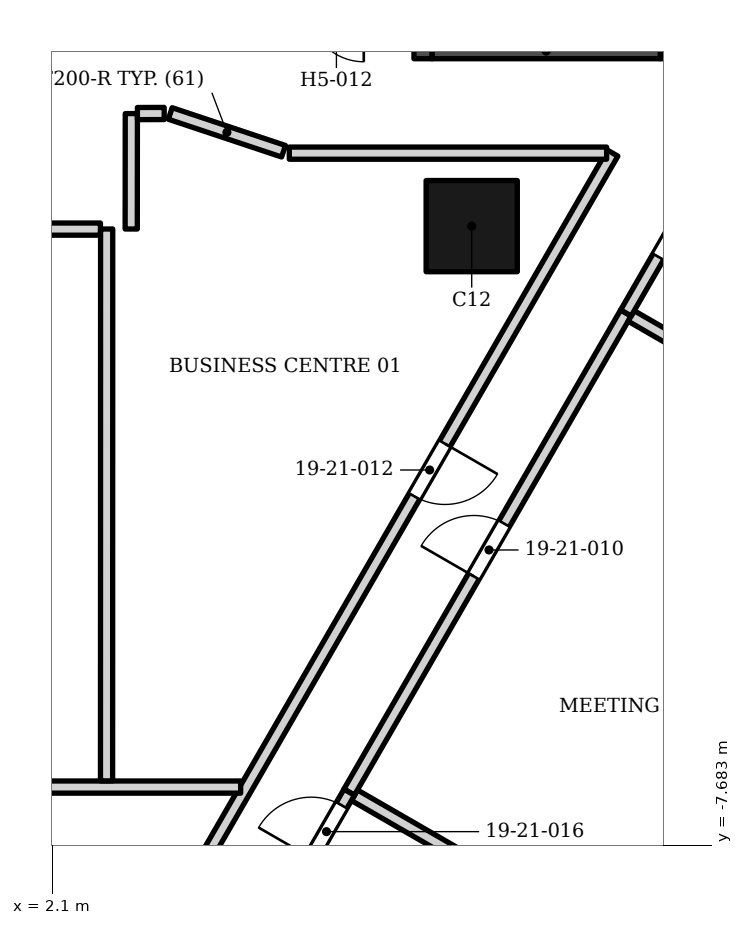
"""IFC4 building model, lengths in metres.
Left out: names, types, materials, properties, quantities, classifications, styles, units other than length and angle.
Written with IfcOpenShell. Run it as: python <this file> out.ifc"""

import sys

from ifc_helpers import new_model, si_unit, direction, frame, frame_2d, origin, origin_2d, place, context, subcontext, project, spatial, rectangle, extrude, element, fill, save


model = new_model("IFC4")
c1 = context("Model", 3, precision=1e-05, world=origin(), true_north=direction((0.0, 1.0)))
c2 = subcontext(c1, "Body", "Model", "MODEL_VIEW")
j1 = project(units=[si_unit("LENGTHUNIT", "METRE"), si_unit("PLANEANGLEUNIT", "RADIAN")], contexts=[c1])
p1 = place(None, origin())
s1 = spatial("IfcSite", under=j1, at=p1, CompositionType="ELEMENT")
p2 = place(p1, origin())
s2 = spatial("IfcBuilding", under=s1, at=p2, CompositionType="ELEMENT")
p3 = place(p2, frame((0.0, 0.0, 91.8)))
s3 = spatial("IfcBuildingStorey", under=s2, at=p3, CompositionType="ELEMENT", Elevation=91.8)
p4 = place(p3, frame((12.35, 5.253, 0.0), z_axis=(0.0, 0.0, 1.0), x_axis=(0.0, 1.0, 0.0)))
e1 = element("IfcWall", 1, at=p4, inside=s3, PredefinedType="SHEAR", context=c2, shape_type="SweptSolid", body=[
    extrude(rectangle(XDim=13.3, YDim=0.5, at=frame_2d((6.65, 0.0))), origin(), (0.0, 0.0, 1.0), 3.4),
])
p5 = place(p3, frame((8.2, 5.253, 0.0), z_axis=(0.0, 0.0, 1.0), x_axis=(0.0, 1.0, 0.0)))
e2 = element("IfcWall", 2, at=p5, inside=s3, PredefinedType="SHEAR", context=c2, shape_type="SweptSolid", body=[
    extrude(rectangle(XDim=13.3, YDim=0.3, at=frame_2d((6.65, 0.0))), origin(), (0.0, 0.0, 1.0), 3.4),
])
p6 = place(p5, frame((7.1, 0.0, 0.0)))
e3 = element("IfcOpeningElement", 3, at=p6, cuts=e2, PredefinedType="OPENING", context=c2, shape_type="SweptSolid", body=[
    extrude(rectangle(XDim=1.4, YDim=2.1, at=frame_2d((0.7, 1.05))), frame((0.0, 0.16, 0.0), z_axis=(0.0, -1.0, 0.0), x_axis=(1.0, 0.0, 0.0)), (0.0, 0.0, 1.0), 0.32),
])
p7 = place(p5, frame((5.05, 0.0, 0.0)))
e4 = element("IfcOpeningElement", 4, at=p7, cuts=e2, PredefinedType="OPENING", context=c2, shape_type="SweptSolid", body=[
    extrude(rectangle(XDim=1.4, YDim=2.1, at=frame_2d((0.7, 1.05))), frame((0.0, 0.16, 0.0), z_axis=(0.0, -1.0, 0.0), x_axis=(1.0, 0.0, 0.0)), (0.0, 0.0, 1.0), 0.32),
])
p8 = place(p3, frame((8.35, 5.378, 0.0), z_axis=(0.0, 0.0, 1.0), x_axis=(1.0, 0.0, 0.0)))
e5 = element("IfcWall", 5, at=p8, inside=s3, PredefinedType="SHEAR", context=c2, shape_type="SweptSolid", body=[
    extrude(rectangle(XDim=3.75, YDim=0.25, at=frame_2d((1.875, 0.0))), origin(), (0.0, 0.0, 1.0), 3.4),
])
p9 = place(p3, frame((9.0, 2.5, 0.0), z_axis=(0.0, 0.0, 1.0), x_axis=(1.0, 0.0, 0.0)))
e6 = element("IfcColumn", 6, at=p9, inside=s3, PredefinedType="COLUMN", context=c2, shape_type="SweptSolid", body=[
    extrude(rectangle(XDim=1.5, YDim=1.5, at=origin_2d()), origin(), (0.0, 0.0, 1.0), 3.4),
])
p10 = place(p3, frame((7.072, -6.86, 0.0), z_axis=(0.0, 0.0, 1.0), x_axis=(0.86615808173, -0.499770124611, 0.0)))
e7 = element("IfcWall", 7, at=p10, inside=s3, PredefinedType="PARTITIONING", context=c2, shape_type="SweptSolid", body=[
    extrude(rectangle(XDim=6.798, YDim=0.2, at=frame_2d((3.399, 0.0))), origin(), (0.0, 0.0, 1.0), 2.552),
])
p11 = place(p3, frame((3.379, -10.049, 0.0), z_axis=(0.0, 0.0, 1.0), x_axis=(0.50000242408, 0.866024004237, 0.0)))
e8 = element("IfcWall", 8, at=p11, inside=s3, PredefinedType="PARTITIONING", context=c2, shape_type="SweptSolid", body=[
    extrude(rectangle(XDim=15.877, YDim=0.2, at=frame_2d((7.938, 0.0))), origin(), (0.0, 0.0, 1.0), 2.384),
])
p12 = place(p11, frame((9.359, 0.0, 0.0)))
e9 = element("IfcOpeningElement", 9, at=p12, cuts=e8, PredefinedType="OPENING", context=c2, shape_type="SweptSolid", body=[
    extrude(rectangle(XDim=1.0, YDim=2.1, at=frame_2d((0.5, 1.05))), frame((0.0, 0.11, 0.0), z_axis=(0.0, -1.0, 0.0), x_axis=(1.0, 0.0, 0.0)), (0.0, 0.0, 1.0), 0.22),
])
p13 = place(p3, frame((6.985, -6.807, 0.0), z_axis=(0.0, 0.0, 1.0), x_axis=(0.500170742348, 0.865926803199, 0.0)))
e10 = element("IfcWall", 10, at=p13, inside=s3, PredefinedType="PARTITIONING", context=c2, shape_type="SweptSolid", body=[
    extrude(rectangle(XDim=9.098, YDim=0.2, at=frame_2d((4.549, 0.0))), origin(), (0.0, 0.0, 1.0), 2.552),
])
p14 = place(p13, frame((4.098, 0.0, 0.0)))
e11 = element("IfcOpeningElement", 11, at=p14, cuts=e10, PredefinedType="OPENING", context=c2, shape_type="SweptSolid", body=[
    extrude(rectangle(XDim=1.0, YDim=2.1, at=frame_2d((0.5, 1.05))), frame((0.0, 0.11, 0.0), z_axis=(0.0, -1.0, 0.0), x_axis=(1.0, 0.0, 0.0)), (0.0, 0.0, 1.0), 0.22),
])
p15 = place(p3, frame((4.786, -10.619, 0.0), z_axis=(0.0, 0.0, 1.0), x_axis=(0.500007539231, 0.866021050964, 0.0)))
e12 = element("IfcWall", 12, at=p15, inside=s3, PredefinedType="PARTITIONING", context=c2, shape_type="SweptSolid", body=[
    extrude(rectangle(XDim=4.398, YDim=0.2, at=frame_2d((2.199, 0.0))), origin(), (0.0, 0.0, 1.0), 3.23),
])
p16 = place(p15, frame((3.15, 0.0, 0.0)))
e13 = element("IfcOpeningElement", 13, at=p16, cuts=e12, PredefinedType="OPENING", context=c2, shape_type="SweptSolid", body=[
    extrude(rectangle(XDim=1.0, YDim=2.1, at=frame_2d((0.5, 1.05))), frame((0.0, 0.11, 0.0), z_axis=(0.0, -1.0, 0.0), x_axis=(1.0, 0.0, 0.0)), (0.0, 0.0, 1.0), 0.22),
])
p17 = place(p3, frame((-5.061, -6.725, 0.0), z_axis=(0.0, 0.0, 1.0), x_axis=(1.0, 0.0, 0.0)))
e14 = element("IfcWall", 14, at=p17, inside=s3, PredefinedType="PARTITIONING", context=c2, shape_type="SweptSolid", body=[
    extrude(rectangle(XDim=10.261, YDim=0.2, at=frame_2d((5.13, 0.0))), origin(), (0.0, 0.0, 1.0), 2.384),
])
p18 = place(p3, frame((11.623, 1.022, 0.0), z_axis=(0.0, 0.0, 1.0), x_axis=(0.865930886033, -0.500163673825, 0.0)))
e15 = element("IfcWall", 15, at=p18, inside=s3, PredefinedType="PARTITIONING", context=c2, shape_type="SweptSolid", body=[
    extrude(rectangle(XDim=7.248, YDim=0.2, at=frame_2d((3.624, 0.0))), origin(), (0.0, 0.0, 1.0), 2.384),
])
p19 = place(p3, frame((-3.4, 2.452, 0.0), z_axis=(0.0, 0.0, 1.0), x_axis=(0.999999963142, -0.000271507243, 0.0)))
e16 = element("IfcWall", 16, at=p19, inside=s3, PredefinedType="PARTITIONING", context=c2, shape_type="SweptSolid", body=[
    extrude(rectangle(XDim=6.294, YDim=0.2, at=frame_2d((3.147, 0.0))), origin(), (0.0, 0.0, 1.0), 3.23),
])
p20 = place(p3, frame((2.994, -6.623, 0.0), z_axis=(0.0, 0.0, 1.0), x_axis=(0.000215209959, 0.999999976842, 0.0)))
e17 = element("IfcWall", 17, at=p20, inside=s3, PredefinedType="PARTITIONING", context=c2, shape_type="SweptSolid", body=[
    extrude(rectangle(XDim=9.075, YDim=0.2, at=frame_2d((4.538, 0.0))), origin(), (0.0, 0.0, 1.0), 3.23),
])
p21 = place(p3, frame((6.0, 3.7, 0.0), z_axis=(0.0, 0.0, 1.0), x_axis=(1.0, 0.0, 0.0)))
e18 = element("IfcWall", 18, at=p21, inside=s3, PredefinedType="PARTITIONING", context=c2, shape_type="SweptSolid", body=[
    extrude(rectangle(XDim=5.219, YDim=0.2, at=frame_2d((2.609, 0.0))), origin(), (0.0, 0.0, 1.0), 2.832),
])
p22 = place(p3, frame((11.536, 1.073, 0.0), z_axis=(0.0, 0.0, 1.0), x_axis=(0.499620231516, 0.866244552225, 0.0)))
e19 = element("IfcWall", 19, at=p22, inside=s3, PredefinedType="PARTITIONING", context=c2, shape_type="SweptSolid", body=[
    extrude(rectangle(XDim=3.032, YDim=0.2, at=frame_2d((1.516, 0.0))), origin(), (0.0, 0.0, 1.0), 3.23),
])
p23 = place(p22, frame((1.066, 0.0, 0.0)))
e20 = element("IfcOpeningElement", 20, at=p23, cuts=e19, PredefinedType="OPENING", context=c2, shape_type="SweptSolid", body=[
    extrude(rectangle(XDim=0.9, YDim=2.1, at=frame_2d((0.45, 1.05))), frame((0.0, 0.11, 0.0), z_axis=(0.0, -1.0, 0.0), x_axis=(1.0, 0.0, 0.0)), (0.0, 0.0, 1.0), 0.22),
])
p24 = place(p3, frame((4.042, 4.352, 0.0), z_axis=(0.0, 0.0, 1.0), x_axis=(0.948695731075, -0.316190464499, 0.0)))
e21 = element("IfcWall", 21, at=p24, inside=s3, PredefinedType="PARTITIONING", context=c2, shape_type="SweptSolid", body=[
    extrude(rectangle(XDim=1.964, YDim=0.2, at=frame_2d((0.982, 0.0))), origin(), (0.0, 0.0, 1.0), 2.384),
])
p25 = place(p3, frame((3.4, 2.452, 0.0), z_axis=(0.0, 0.0, 1.0), x_axis=(0.001028938362, 0.999999470643, 0.0)))
e22 = element("IfcWall", 22, at=p25, inside=s3, PredefinedType="PARTITIONING", context=c2, shape_type="SweptSolid", body=[
    extrude(rectangle(XDim=1.898, YDim=0.2, at=frame_2d((0.949, 0.0))), origin(), (0.0, 0.0, 1.0), 3.23),
])
p26 = place(p3, frame((3.502, 4.351, 0.0), z_axis=(0.0, 0.0, 1.0), x_axis=(0.999996159087, 0.00277160798, 0.0)))
e23 = element("IfcWall", 23, at=p26, inside=s3, PredefinedType="PARTITIONING", context=c2, shape_type="SweptSolid", body=[
    extrude(rectangle(XDim=0.44, YDim=0.2, at=frame_2d((0.22, 0.0))), origin(), (0.0, 0.0, 1.0), 3.23),
])
p27 = place(p14, origin())
e24 = element("IfcDoor", 24, at=p27, inside=s3, OperationType="SINGLE_SWING_LEFT", PredefinedType="DOOR", context=c2, shape_type="SweptSolid", body=[
    extrude(rectangle(XDim=1.0, YDim=2.1, at=frame_2d((0.5, 1.05))), frame((0.0, 0.025, 0.0), z_axis=(0.0, -1.0, 0.0), x_axis=(1.0, 0.0, 0.0)), (0.0, 0.0, 1.0), 0.05),
])
fill(e11, e24)
p28 = place(p12, origin())
e25 = element("IfcDoor", 25, at=p28, inside=s3, OperationType="SINGLE_SWING_RIGHT", PredefinedType="DOOR", context=c2, shape_type="SweptSolid", body=[
    extrude(rectangle(XDim=1.0, YDim=2.1, at=frame_2d((0.5, 1.05))), frame((0.0, 0.025, 0.0), z_axis=(0.0, -1.0, 0.0), x_axis=(1.0, 0.0, 0.0)), (0.0, 0.0, 1.0), 0.05),
])
fill(e9, e25)
p29 = place(p16, origin())
e26 = element("IfcDoor", 26, at=p29, inside=s3, OperationType="SINGLE_SWING_LEFT", PredefinedType="DOOR", context=c2, shape_type="SweptSolid", body=[
    extrude(rectangle(XDim=1.0, YDim=2.1, at=frame_2d((0.5, 1.05))), frame((0.0, 0.025, 0.0), z_axis=(0.0, -1.0, 0.0), x_axis=(1.0, 0.0, 0.0)), (0.0, 0.0, 1.0), 0.05),
])
fill(e13, e26)
p30 = place(p23, origin())
e27 = element("IfcDoor", 27, at=p30, inside=s3, OperationType="SINGLE_SWING_RIGHT", PredefinedType="DOOR", context=c2, shape_type="SweptSolid", body=[
    extrude(rectangle(XDim=0.9, YDim=2.1, at=frame_2d((0.45, 1.05))), frame((0.0, 0.025, 0.0), z_axis=(0.0, -1.0, 0.0), x_axis=(1.0, 0.0, 0.0)), (0.0, 0.0, 1.0), 0.05),
])
fill(e20, e27)
save(model, sys.argv[1])
